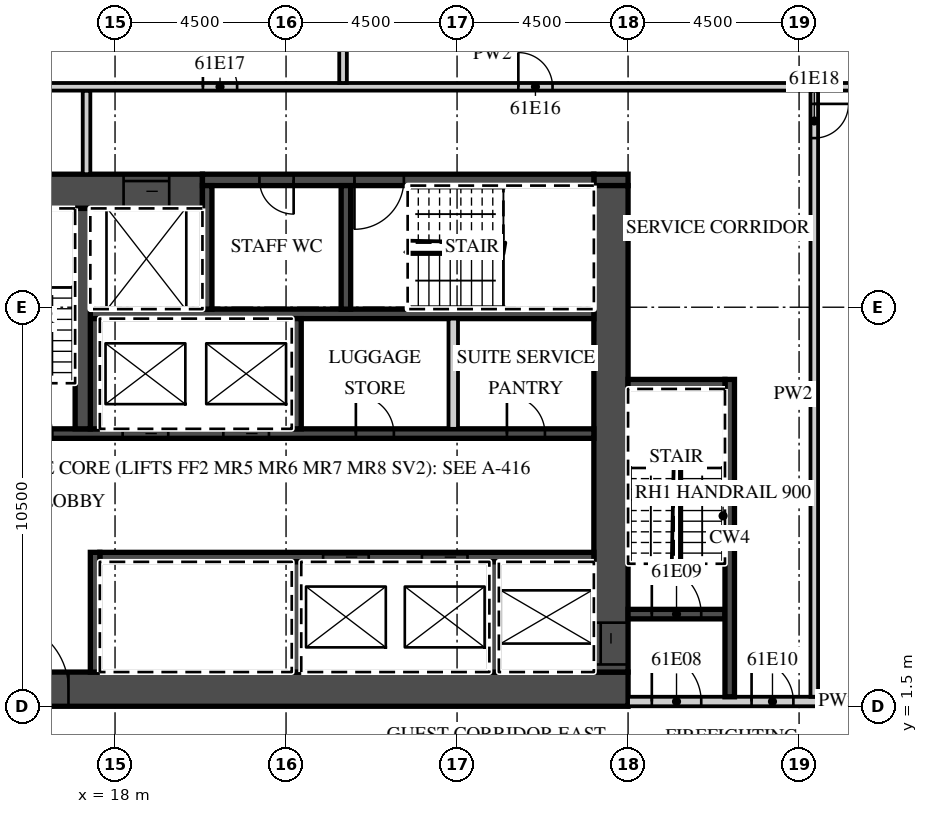
"""IFC4 building model, lengths in metres.
Left out: names, types, materials, properties, quantities, classifications, styles, units other than length and angle.
Written with IfcOpenShell. Run it as: python <this file> out.ifc"""

import sys

from ifc_helpers import new_model, si_unit, direction, frame, frame_2d, origin, place, context, subcontext, project, spatial, rectangle, extrude, element, fill, save


model = new_model("IFC4")
c1 = context("Model", 3, precision=1e-05, world=origin(), true_north=direction((0.0, 1.0)))
c2 = subcontext(c1, "Body", "Model", "MODEL_VIEW")
j1 = project(units=[si_unit("LENGTHUNIT", "METRE"), si_unit("PLANEANGLEUNIT", "RADIAN")], contexts=[c1])
p1 = place(None, origin())
s1 = spatial("IfcSite", under=j1, at=p1, CompositionType="ELEMENT")
p2 = place(p1, origin())
s2 = spatial("IfcBuilding", under=s1, at=p2, CompositionType="ELEMENT")
p3 = place(p2, frame((0.0, 0.0, 247.4)))
s3 = spatial("IfcBuildingStorey", under=s2, at=p3, CompositionType="ELEMENT", Elevation=247.4)
p4 = place(p3, frame((13.5, 1.95, 0.0), z_axis=(0.0, 0.0, 1.0), x_axis=(1.0, 0.0, 0.0)))
e1 = element("IfcWall", 1, at=p4, inside=s3, PredefinedType="SHEAR", context=c2, shape_type="SweptSolid", body=[
    extrude(rectangle(XDim=18.0, YDim=0.9, at=frame_2d((9.0, 0.0))), origin(), (0.0, 0.0, 1.0), 3.02),
])
p5 = place(p4, frame((1.475, 0.0, 0.0)))
e2 = element("IfcOpeningElement", 2, at=p5, cuts=e1, PredefinedType="OPENING", context=c2, shape_type="SweptSolid", body=[
    extrude(rectangle(XDim=1.8, YDim=2.1, at=frame_2d((0.9, 1.05))), frame((0.0, 0.46, 0.0), z_axis=(0.0, -1.0, 0.0), x_axis=(1.0, 0.0, 0.0)), (0.0, 0.0, 1.0), 0.92),
])
p6 = place(p3, frame((13.5, 15.05, 0.0), z_axis=(0.0, 0.0, 1.0), x_axis=(1.0, 0.0, 0.0)))
e3 = element("IfcWall", 3, at=p6, inside=s3, PredefinedType="SHEAR", context=c2, shape_type="SweptSolid", body=[
    extrude(rectangle(XDim=6.8, YDim=0.9, at=frame_2d((3.4, 0.0))), origin(), (0.0, 0.0, 1.0), 3.02),
])
p7 = place(p6, frame((4.725, 0.0, 0.0)))
e4 = element("IfcOpeningElement", 4, at=p7, cuts=e3, PredefinedType="OPENING", context=c2, shape_type="SweptSolid", body=[
    extrude(rectangle(XDim=1.2, YDim=2.1, at=frame_2d((0.6, 1.05))), frame((0.0, 0.46, 0.0), z_axis=(0.0, -1.0, 0.0), x_axis=(1.0, 0.0, 0.0)), (0.0, 0.0, 1.0), 0.92),
])
p8 = place(p3, frame((30.6, 15.35, 0.0), z_axis=(0.0, 0.0, 1.0), x_axis=(1.0, 0.0, 0.0)))
e5 = element("IfcWall", 5, at=p8, inside=s3, PredefinedType="SHEAR", context=c2, shape_type="SweptSolid", body=[
    extrude(rectangle(XDim=0.9, YDim=0.3, at=frame_2d((0.45, 0.0))), origin(), (0.0, 0.0, 1.0), 3.02),
])
p9 = place(p3, frame((20.3, 15.35, 0.0), z_axis=(0.0, 0.0, 1.0), x_axis=(1.0, 0.0, 0.0)))
e6 = element("IfcWall", 6, at=p9, inside=s3, PredefinedType="SHEAR", context=c2, shape_type="SweptSolid", body=[
    extrude(rectangle(XDim=10.3, YDim=0.3, at=frame_2d((5.15, 0.0))), origin(), (0.0, 0.0, 1.0), 3.02),
])
p10 = place(p9, frame((4.0, 0.0, 0.0)))
e7 = element("IfcOpeningElement", 7, at=p10, cuts=e6, PredefinedType="OPENING", context=c2, shape_type="SweptSolid", body=[
    extrude(rectangle(XDim=1.3, YDim=2.1, at=frame_2d((0.65, 1.05))), frame((0.0, 0.16, 0.0), z_axis=(0.0, -1.0, 0.0), x_axis=(1.0, 0.0, 0.0)), (0.0, 0.0, 1.0), 0.32),
])
p11 = place(p9, frame((1.5, 0.0, 0.0)))
e8 = element("IfcOpeningElement", 8, at=p11, cuts=e6, PredefinedType="OPENING", context=c2, shape_type="SweptSolid", body=[
    extrude(rectangle(XDim=0.9, YDim=2.1, at=frame_2d((0.45, 1.05))), frame((0.0, 0.16, 0.0), z_axis=(0.0, -1.0, 0.0), x_axis=(1.0, 0.0, 0.0)), (0.0, 0.0, 1.0), 0.32),
])
p12 = place(p3, frame((31.05, 2.4, 0.0), z_axis=(0.0, 0.0, 1.0), x_axis=(0.0, 1.0, 0.0)))
e9 = element("IfcWall", 9, at=p12, inside=s3, PredefinedType="SHEAR", context=c2, shape_type="SweptSolid", body=[
    extrude(rectangle(XDim=12.8, YDim=0.9, at=frame_2d((6.4, 0.0))), origin(), (0.0, 0.0, 1.0), 3.02),
])
p13 = place(p12, frame((0.2, 0.0, 0.0)))
e10 = element("IfcOpeningElement", 10, at=p13, cuts=e9, PredefinedType="OPENING", context=c2, shape_type="SweptSolid", body=[
    extrude(rectangle(XDim=1.1, YDim=2.1, at=frame_2d((0.55, 1.05))), frame((0.0, 0.46, 0.0), z_axis=(0.0, -1.0, 0.0), x_axis=(1.0, 0.0, 0.0)), (0.0, 0.0, 1.0), 0.92),
])
p14 = place(p3, frame((17.6, 5.425, 0.0), z_axis=(0.0, 0.0, 1.0), x_axis=(1.0, 0.0, 0.0)))
e11 = element("IfcWall", 11, at=p14, inside=s3, PredefinedType="SHEAR", context=c2, shape_type="SweptSolid", body=[
    extrude(rectangle(XDim=13.0, YDim=0.25, at=frame_2d((6.5, 0.0))), origin(), (0.0, 0.0, 1.0), 3.02),
])
p15 = place(p14, frame((8.475, 0.0, 0.0)))
e12 = element("IfcOpeningElement", 12, at=p15, cuts=e11, PredefinedType="OPENING", context=c2, shape_type="SweptSolid", body=[
    extrude(rectangle(XDim=1.2, YDim=2.1, at=frame_2d((0.6, 1.05))), frame((0.0, 0.135, 0.0), z_axis=(0.0, -1.0, 0.0), x_axis=(1.0, 0.0, 0.0)), (0.0, 0.0, 1.0), 0.27),
])
p16 = place(p14, frame((5.875, 0.0, 0.0)))
e13 = element("IfcOpeningElement", 13, at=p16, cuts=e11, PredefinedType="OPENING", context=c2, shape_type="SweptSolid", body=[
    extrude(rectangle(XDim=1.2, YDim=2.1, at=frame_2d((0.6, 1.05))), frame((0.0, 0.135, 0.0), z_axis=(0.0, -1.0, 0.0), x_axis=(1.0, 0.0, 0.0)), (0.0, 0.0, 1.0), 0.27),
])
p17 = place(p3, frame((17.475, 2.4, 0.0), z_axis=(0.0, 0.0, 1.0), x_axis=(0.0, 1.0, 0.0)))
e14 = element("IfcWall", 14, at=p17, inside=s3, PredefinedType="SHEAR", context=c2, shape_type="SweptSolid", body=[
    extrude(rectangle(XDim=3.15, YDim=0.25, at=frame_2d((1.575, 0.0))), origin(), (0.0, 0.0, 1.0), 3.02),
])
for number, where, z_axis, x_axis in (
    (15, (27.975, 2.4, 0.0), (0.0, 0.0, 1.0), (0.0, 1.0, 0.0)),
    (16, (22.775, 2.4, 0.0), (0.0, 0.0, 1.0), (0.0, 1.0, 0.0)),
):
    element("IfcWall", number, at=place(p3, frame(where, z_axis=z_axis, x_axis=x_axis)), inside=s3, PredefinedType="SHEAR", context=c2, shape_type="SweptSolid", body=[
        extrude(rectangle(XDim=2.9, YDim=0.25, at=frame_2d((1.45, 0.0))), origin(), (0.0, 0.0, 1.0), 3.02),
    ])
p18 = place(p3, frame((14.4, 8.675, 0.0), z_axis=(0.0, 0.0, 1.0), x_axis=(1.0, 0.0, 0.0)))
e17 = element("IfcWall", 17, at=p18, inside=s3, PredefinedType="SHEAR", context=c2, shape_type="SweptSolid", body=[
    extrude(rectangle(XDim=16.2, YDim=0.25, at=frame_2d((8.1, 0.0))), origin(), (0.0, 0.0, 1.0), 3.02),
])
p19 = place(p18, frame((6.45, 0.0, 0.0)))
e18 = element("IfcOpeningElement", 18, at=p19, cuts=e17, PredefinedType="OPENING", context=c2, shape_type="SweptSolid", body=[
    extrude(rectangle(XDim=1.2, YDim=2.1, at=frame_2d((0.6, 1.05))), frame((0.0, 0.135, 0.0), z_axis=(0.0, -1.0, 0.0), x_axis=(1.0, 0.0, 0.0)), (0.0, 0.0, 1.0), 0.27),
])
p20 = place(p18, frame((3.8, 0.0, 0.0)))
e19 = element("IfcOpeningElement", 19, at=p20, cuts=e17, PredefinedType="OPENING", context=c2, shape_type="SweptSolid", body=[
    extrude(rectangle(XDim=1.2, YDim=2.1, at=frame_2d((0.6, 1.05))), frame((0.0, 0.135, 0.0), z_axis=(0.0, -1.0, 0.0), x_axis=(1.0, 0.0, 0.0)), (0.0, 0.0, 1.0), 0.27),
])
p21 = place(p18, frame((0.65, 0.0, 0.0)))
e20 = element("IfcOpeningElement", 20, at=p21, cuts=e17, PredefinedType="OPENING", context=c2, shape_type="SweptSolid", body=[
    extrude(rectangle(XDim=1.3, YDim=2.1, at=frame_2d((0.65, 1.05))), frame((0.0, 0.135, 0.0), z_axis=(0.0, -1.0, 0.0), x_axis=(1.0, 0.0, 0.0)), (0.0, 0.0, 1.0), 0.27),
])
p22 = place(p18, frame((13.913, 0.0, 0.0)))
e21 = element("IfcOpeningElement", 21, at=p22, cuts=e17, PredefinedType="OPENING", context=c2, shape_type="SweptSolid", body=[
    extrude(rectangle(XDim=1.0, YDim=2.1, at=frame_2d((0.5, 1.05))), frame((0.0, 0.135, 0.0), z_axis=(0.0, -1.0, 0.0), x_axis=(1.0, 0.0, 0.0)), (0.0, 0.0, 1.0), 0.27),
])
p23 = place(p18, frame((9.938, 0.0, 0.0)))
e22 = element("IfcOpeningElement", 22, at=p23, cuts=e17, PredefinedType="OPENING", context=c2, shape_type="SweptSolid", body=[
    extrude(rectangle(XDim=1.0, YDim=2.1, at=frame_2d((0.5, 1.05))), frame((0.0, 0.135, 0.0), z_axis=(0.0, -1.0, 0.0), x_axis=(1.0, 0.0, 0.0)), (0.0, 0.0, 1.0), 0.27),
])
p24 = place(p3, frame((17.35, 11.825, 0.0), z_axis=(0.0, 0.0, 1.0), x_axis=(1.0, 0.0, 0.0)))
e23 = element("IfcWall", 23, at=p24, inside=s3, PredefinedType="SHEAR", context=c2, shape_type="SweptSolid", body=[
    extrude(rectangle(XDim=13.25, YDim=0.25, at=frame_2d((6.625, 0.0))), origin(), (0.0, 0.0, 1.0), 3.02),
])
for number, where, z_axis, x_axis in (
    (24, (17.475, 8.8, 0.0), (0.0, 0.0, 1.0), (0.0, 1.0, 0.0)),
    (25, (22.775, 8.8, 0.0), (0.0, 0.0, 1.0), (0.0, 1.0, 0.0)),
):
    element("IfcWall", number, at=place(p3, frame(where, z_axis=z_axis, x_axis=x_axis)), inside=s3, PredefinedType="SHEAR", context=c2, shape_type="SweptSolid", body=[
        extrude(rectangle(XDim=2.9, YDim=0.25, at=frame_2d((1.45, 0.0))), origin(), (0.0, 0.0, 1.0), 3.02),
    ])
p25 = place(p3, frame((26.9, 8.8, 0.0), z_axis=(0.0, 0.0, 1.0), x_axis=(0.0, 1.0, 0.0)))
e26 = element("IfcWall", 26, at=p25, inside=s3, PredefinedType="PARTITIONING", context=c2, shape_type="SweptSolid", body=[
    extrude(rectangle(XDim=2.9, YDim=0.25, at=frame_2d((1.45, 0.0))), origin(), (0.0, 0.0, 1.0), 3.02),
])
p26 = place(p3, frame((17.15, 8.8, 0.0), z_axis=(0.0, 0.0, 1.0), x_axis=(0.0, 1.0, 0.0)))
e27 = element("IfcWall", 27, at=p26, inside=s3, PredefinedType="SHEAR", context=c2, shape_type="SweptSolid", body=[
    extrude(rectangle(XDim=5.8, YDim=0.4, at=frame_2d((2.9, 0.0))), origin(), (0.0, 0.0, 1.0), 3.02),
])
for number, where, z_axis, x_axis in (
    (28, (20.425, 11.95, 0.0), (0.0, 0.0, 1.0), (0.0, 1.0, 0.0)),
    (29, (24.075, 11.95, 0.0), (0.0, 0.0, 1.0), (0.0, 1.0, 0.0)),
):
    element("IfcWall", number, at=place(p3, frame(where, z_axis=z_axis, x_axis=x_axis)), inside=s3, PredefinedType="SHEAR", context=c2, shape_type="SweptSolid", body=[
        extrude(rectangle(XDim=3.25, YDim=0.25, at=frame_2d((1.625, 0.0))), origin(), (0.0, 0.0, 1.0), 3.02),
    ])
p27 = place(p3, frame((31.5, 1.625, 0.0), z_axis=(0.0, 0.0, 1.0), x_axis=(1.0, 0.0, 0.0)))
e30 = element("IfcWall", 30, at=p27, inside=s3, PredefinedType="PARTITIONING", context=c2, shape_type="SweptSolid", body=[
    extrude(rectangle(XDim=11.04, YDim=0.25, at=frame_2d((5.52, 0.0))), origin(), (0.0, 0.0, 1.0), 3.02),
])
p28 = place(p27, frame((0.625, 0.0, 0.0)))
e31 = element("IfcOpeningElement", 31, at=p28, cuts=e30, PredefinedType="OPENING", context=c2, shape_type="SweptSolid", body=[
    extrude(rectangle(XDim=1.3, YDim=2.1, at=frame_2d((0.65, 1.05))), frame((0.0, 0.135, 0.0), z_axis=(0.0, -1.0, 0.0), x_axis=(1.0, 0.0, 0.0)), (0.0, 0.0, 1.0), 0.27),
])
p29 = place(p27, frame((3.25, 0.0, 0.0)))
e32 = element("IfcOpeningElement", 32, at=p29, cuts=e30, PredefinedType="OPENING", context=c2, shape_type="SweptSolid", body=[
    extrude(rectangle(XDim=1.1, YDim=2.1, at=frame_2d((0.55, 1.05))), frame((0.0, 0.135, 0.0), z_axis=(0.0, -1.0, 0.0), x_axis=(1.0, 0.0, 0.0)), (0.0, 0.0, 1.0), 0.27),
])
p30 = place(p3, frame((31.5, 3.925, 0.0), z_axis=(0.0, 0.0, 1.0), x_axis=(1.0, 0.0, 0.0)))
e33 = element("IfcWall", 33, at=p30, inside=s3, PredefinedType="SHEAR", context=c2, shape_type="SweptSolid", body=[
    extrude(rectangle(XDim=2.55, YDim=0.25, at=frame_2d((1.275, 0.0))), origin(), (0.0, 0.0, 1.0), 3.02),
])
p31 = place(p30, frame((0.625, 0.0, 0.0)))
e34 = element("IfcOpeningElement", 34, at=p31, cuts=e33, PredefinedType="OPENING", context=c2, shape_type="SweptSolid", body=[
    extrude(rectangle(XDim=1.3, YDim=2.1, at=frame_2d((0.65, 1.05))), frame((0.0, 0.135, 0.0), z_axis=(0.0, -1.0, 0.0), x_axis=(1.0, 0.0, 0.0)), (0.0, 0.0, 1.0), 0.27),
])
p32 = place(p3, frame((34.175, 1.75, 0.0), z_axis=(0.0, 0.0, 1.0), x_axis=(0.0, 1.0, 0.0)))
e35 = element("IfcWall", 35, at=p32, inside=s3, PredefinedType="SHEAR", context=c2, shape_type="SweptSolid", body=[
    extrude(rectangle(XDim=8.35, YDim=0.25, at=frame_2d((4.175, 0.0))), origin(), (0.0, 0.0, 1.0), 3.02),
])
p33 = place(p3, frame((31.5, 9.975, 0.0), z_axis=(0.0, 0.0, 1.0), x_axis=(1.0, 0.0, 0.0)))
e36 = element("IfcWall", 36, at=p33, inside=s3, PredefinedType="SHEAR", context=c2, shape_type="SweptSolid", body=[
    extrude(rectangle(XDim=2.55, YDim=0.25, at=frame_2d((1.275, 0.0))), origin(), (0.0, 0.0, 1.0), 3.02),
])
p34 = place(p3, frame((17.25, 15.5, 0.0), z_axis=(0.0, 0.0, 1.0), x_axis=(0.0, 1.0, 0.0)))
e37 = element("IfcWall", 37, at=p34, inside=s3, PredefinedType="PARTITIONING", context=c2, shape_type="SweptSolid", body=[
    extrude(rectangle(XDim=2.2, YDim=0.2, at=frame_2d((1.1, 0.0))), origin(), (0.0, 0.0, 1.0), 3.02),
])
p35 = place(p3, frame((36.4, 1.75, 0.0), z_axis=(0.0, 0.0, 1.0), x_axis=(0.0, 1.0, 0.0)))
e38 = element("IfcWall", 38, at=p35, inside=s3, PredefinedType="PARTITIONING", context=c2, shape_type="SweptSolid", body=[
    extrude(rectangle(XDim=15.95, YDim=0.2, at=frame_2d((7.975, 0.0))), origin(), (0.0, 0.0, 1.0), 3.02),
])
p36 = place(p35, frame((14.7, 0.0, 0.0)))
e39 = element("IfcOpeningElement", 39, at=p36, cuts=e38, PredefinedType="OPENING", context=c2, shape_type="SweptSolid", body=[
    extrude(rectangle(XDim=0.9, YDim=2.1, at=frame_2d((0.45, 1.05))), frame((0.0, 0.11, 0.0), z_axis=(0.0, -1.0, 0.0), x_axis=(1.0, 0.0, 0.0)), (0.0, 0.0, 1.0), 0.22),
])
p37 = place(p3, frame((13.6, 17.8, 0.0), z_axis=(0.0, 0.0, 1.0), x_axis=(1.0, 0.0, 0.0)))
e40 = element("IfcWall", 40, at=p37, inside=s3, PredefinedType="PARTITIONING", context=c2, shape_type="SweptSolid", body=[
    extrude(rectangle(XDim=28.657, YDim=0.2, at=frame_2d((14.329, 0.0))), origin(), (0.0, 0.0, 1.0), 3.02),
])
p38 = place(p37, frame((15.012, 0.0, 0.0)))
e41 = element("IfcOpeningElement", 41, at=p38, cuts=e40, PredefinedType="OPENING", context=c2, shape_type="SweptSolid", body=[
    extrude(rectangle(XDim=0.9, YDim=2.1, at=frame_2d((0.45, 1.05))), frame((0.0, 0.11, 0.0), z_axis=(0.0, -1.0, 0.0), x_axis=(1.0, 0.0, 0.0)), (0.0, 0.0, 1.0), 0.22),
])
p39 = place(p37, frame((6.712, 0.0, 0.0)))
e42 = element("IfcOpeningElement", 42, at=p39, cuts=e40, PredefinedType="OPENING", context=c2, shape_type="SweptSolid", body=[
    extrude(rectangle(XDim=0.9, YDim=2.1, at=frame_2d((0.45, 1.05))), frame((0.0, 0.11, 0.0), z_axis=(0.0, -1.0, 0.0), x_axis=(1.0, 0.0, 0.0)), (0.0, 0.0, 1.0), 0.22),
])
p40 = place(p3, frame((24.0, 17.9, 0.0), z_axis=(0.0, 0.0, 1.0), x_axis=(0.0, 1.0, 0.0)))
e43 = element("IfcWall", 43, at=p40, inside=s3, PredefinedType="PARTITIONING", context=c2, shape_type="SweptSolid", body=[
    extrude(rectangle(XDim=3.22, YDim=0.2, at=frame_2d((1.61, 0.0))), origin(), (0.0, 0.0, 1.0), 3.02),
])
p41 = place(p19, origin())
e44 = element("IfcDoor", 44, at=p41, inside=s3, OperationType="SLIDING_TO_LEFT", PredefinedType="DOOR", context=c2, shape_type="SweptSolid", body=[
    extrude(rectangle(XDim=1.2, YDim=2.1, at=frame_2d((0.6, 1.05))), frame((0.0, 0.025, 0.0), z_axis=(0.0, -1.0, 0.0), x_axis=(1.0, 0.0, 0.0)), (0.0, 0.0, 1.0), 0.05),
])
fill(e18, e44)
p42 = place(p20, origin())
e45 = element("IfcDoor", 45, at=p42, inside=s3, OperationType="SLIDING_TO_RIGHT", PredefinedType="DOOR", context=c2, shape_type="SweptSolid", body=[
    extrude(rectangle(XDim=1.2, YDim=2.1, at=frame_2d((0.6, 1.05))), frame((0.0, 0.025, 0.0), z_axis=(0.0, -1.0, 0.0), x_axis=(1.0, 0.0, 0.0)), (0.0, 0.0, 1.0), 0.05),
])
fill(e19, e45)
p43 = place(p15, origin())
e46 = element("IfcDoor", 46, at=p43, inside=s3, OperationType="SLIDING_TO_LEFT", PredefinedType="DOOR", context=c2, shape_type="SweptSolid", body=[
    extrude(rectangle(XDim=1.2, YDim=2.1, at=frame_2d((0.6, 1.05))), frame((0.0, 0.025, 0.0), z_axis=(0.0, -1.0, 0.0), x_axis=(1.0, 0.0, 0.0)), (0.0, 0.0, 1.0), 0.05),
])
fill(e12, e46)
p44 = place(p16, origin())
e47 = element("IfcDoor", 47, at=p44, inside=s3, OperationType="SLIDING_TO_RIGHT", PredefinedType="DOOR", context=c2, shape_type="SweptSolid", body=[
    extrude(rectangle(XDim=1.2, YDim=2.1, at=frame_2d((0.6, 1.05))), frame((0.0, 0.025, 0.0), z_axis=(0.0, -1.0, 0.0), x_axis=(1.0, 0.0, 0.0)), (0.0, 0.0, 1.0), 0.05),
])
fill(e13, e47)
p45 = place(p7, origin())
e48 = element("IfcDoor", 48, at=p45, inside=s3, OperationType="SLIDING_TO_LEFT", PredefinedType="DOOR", context=c2, shape_type="SweptSolid", body=[
    extrude(rectangle(XDim=1.2, YDim=2.1, at=frame_2d((0.6, 1.05))), frame((0.0, 0.025, 0.0), z_axis=(0.0, -1.0, 0.0), x_axis=(1.0, 0.0, 0.0)), (0.0, 0.0, 1.0), 0.05),
])
fill(e4, e48)
p46 = place(p13, origin())
e49 = element("IfcDoor", 49, at=p46, inside=s3, OperationType="SLIDING_TO_LEFT", PredefinedType="DOOR", context=c2, shape_type="SweptSolid", body=[
    extrude(rectangle(XDim=1.1, YDim=2.1, at=frame_2d((0.55, 1.05))), frame((0.0, 0.025, 0.0), z_axis=(0.0, -1.0, 0.0), x_axis=(1.0, 0.0, 0.0)), (0.0, 0.0, 1.0), 0.05),
])
fill(e10, e49)
p47 = place(p5, origin())
e50 = element("IfcDoor", 50, at=p47, inside=s3, OperationType="DOUBLE_DOOR_DOUBLE_SWING", PredefinedType="DOOR", context=c2, shape_type="SweptSolid", body=[
    extrude(rectangle(XDim=1.8, YDim=2.1, at=frame_2d((0.9, 1.05))), frame((0.0, 0.025, 0.0), z_axis=(0.0, -1.0, 0.0), x_axis=(1.0, 0.0, 0.0)), (0.0, 0.0, 1.0), 0.05),
])
fill(e2, e50)
p48 = place(p28, origin())
e51 = element("IfcDoor", 51, at=p48, inside=s3, OperationType="SINGLE_SWING_LEFT", PredefinedType="DOOR", context=c2, shape_type="SweptSolid", body=[
    extrude(rectangle(XDim=1.3, YDim=2.1, at=frame_2d((0.65, 1.05))), frame((0.0, 0.025, 0.0), z_axis=(0.0, -1.0, 0.0), x_axis=(1.0, 0.0, 0.0)), (0.0, 0.0, 1.0), 0.05),
])
fill(e31, e51)
p49 = place(p31, origin())
e52 = element("IfcDoor", 52, at=p49, inside=s3, OperationType="SINGLE_SWING_LEFT", PredefinedType="DOOR", context=c2, shape_type="SweptSolid", body=[
    extrude(rectangle(XDim=1.3, YDim=2.1, at=frame_2d((0.65, 1.05))), frame((0.0, 0.025, 0.0), z_axis=(0.0, -1.0, 0.0), x_axis=(1.0, 0.0, 0.0)), (0.0, 0.0, 1.0), 0.05),
])
fill(e34, e52)
p50 = place(p29, origin())
e53 = element("IfcDoor", 53, at=p50, inside=s3, OperationType="SINGLE_SWING_LEFT", PredefinedType="DOOR", context=c2, shape_type="SweptSolid", body=[
    extrude(rectangle(XDim=1.1, YDim=2.1, at=frame_2d((0.55, 1.05))), frame((0.0, 0.025, 0.0), z_axis=(0.0, -1.0, 0.0), x_axis=(1.0, 0.0, 0.0)), (0.0, 0.0, 1.0), 0.05),
])
fill(e32, e53)
p51 = place(p10, origin())
e54 = element("IfcDoor", 54, at=p51, inside=s3, OperationType="SINGLE_SWING_LEFT", PredefinedType="DOOR", context=c2, shape_type="SweptSolid", body=[
    extrude(rectangle(XDim=1.3, YDim=2.1, at=frame_2d((0.65, 1.05))), frame((0.0, 0.025, 0.0), z_axis=(0.0, -1.0, 0.0), x_axis=(1.0, 0.0, 0.0)), (0.0, 0.0, 1.0), 0.05),
])
fill(e7, e54)
p52 = place(p11, origin())
e55 = element("IfcDoor", 55, at=p52, inside=s3, OperationType="SINGLE_SWING_RIGHT", PredefinedType="DOOR", context=c2, shape_type="SweptSolid", body=[
    extrude(rectangle(XDim=0.9, YDim=2.1, at=frame_2d((0.45, 1.05))), frame((0.0, 0.025, 0.0), z_axis=(0.0, -1.0, 0.0), x_axis=(1.0, 0.0, 0.0)), (0.0, 0.0, 1.0), 0.05),
])
fill(e8, e55)
p53 = place(p22, origin())
e56 = element("IfcDoor", 56, at=p53, inside=s3, OperationType="SINGLE_SWING_LEFT", PredefinedType="DOOR", context=c2, shape_type="SweptSolid", body=[
    extrude(rectangle(XDim=1.0, YDim=2.1, at=frame_2d((0.5, 1.05))), frame((0.0, 0.025, 0.0), z_axis=(0.0, -1.0, 0.0), x_axis=(1.0, 0.0, 0.0)), (0.0, 0.0, 1.0), 0.05),
])
fill(e21, e56)
p54 = place(p23, origin())
e57 = element("IfcDoor", 57, at=p54, inside=s3, OperationType="SINGLE_SWING_LEFT", PredefinedType="DOOR", context=c2, shape_type="SweptSolid", body=[
    extrude(rectangle(XDim=1.0, YDim=2.1, at=frame_2d((0.5, 1.05))), frame((0.0, 0.025, 0.0), z_axis=(0.0, -1.0, 0.0), x_axis=(1.0, 0.0, 0.0)), (0.0, 0.0, 1.0), 0.05),
])
fill(e22, e57)
p55 = place(p38, origin())
e58 = element("IfcDoor", 58, at=p55, inside=s3, OperationType="SINGLE_SWING_LEFT", PredefinedType="DOOR", context=c2, shape_type="SweptSolid", body=[
    extrude(rectangle(XDim=0.9, YDim=2.1, at=frame_2d((0.45, 1.05))), frame((0.0, 0.025, 0.0), z_axis=(0.0, -1.0, 0.0), x_axis=(1.0, 0.0, 0.0)), (0.0, 0.0, 1.0), 0.05),
])
fill(e41, e58)
p56 = place(p39, origin())
e59 = element("IfcDoor", 59, at=p56, inside=s3, OperationType="SINGLE_SWING_LEFT", PredefinedType="DOOR", context=c2, shape_type="SweptSolid", body=[
    extrude(rectangle(XDim=0.9, YDim=2.1, at=frame_2d((0.45, 1.05))), frame((0.0, 0.025, 0.0), z_axis=(0.0, -1.0, 0.0), x_axis=(1.0, 0.0, 0.0)), (0.0, 0.0, 1.0), 0.05),
])
fill(e42, e59)
p57 = place(p36, origin())
e60 = element("IfcDoor", 60, at=p57, inside=s3, OperationType="SINGLE_SWING_RIGHT", PredefinedType="DOOR", context=c2, shape_type="SweptSolid", body=[
    extrude(rectangle(XDim=0.9, YDim=2.1, at=frame_2d((0.45, 1.05))), frame((0.0, 0.025, 0.0), z_axis=(0.0, -1.0, 0.0), x_axis=(1.0, 0.0, 0.0)), (0.0, 0.0, 1.0), 0.05),
])
fill(e39, e60)
save(model, sys.argv[1])
